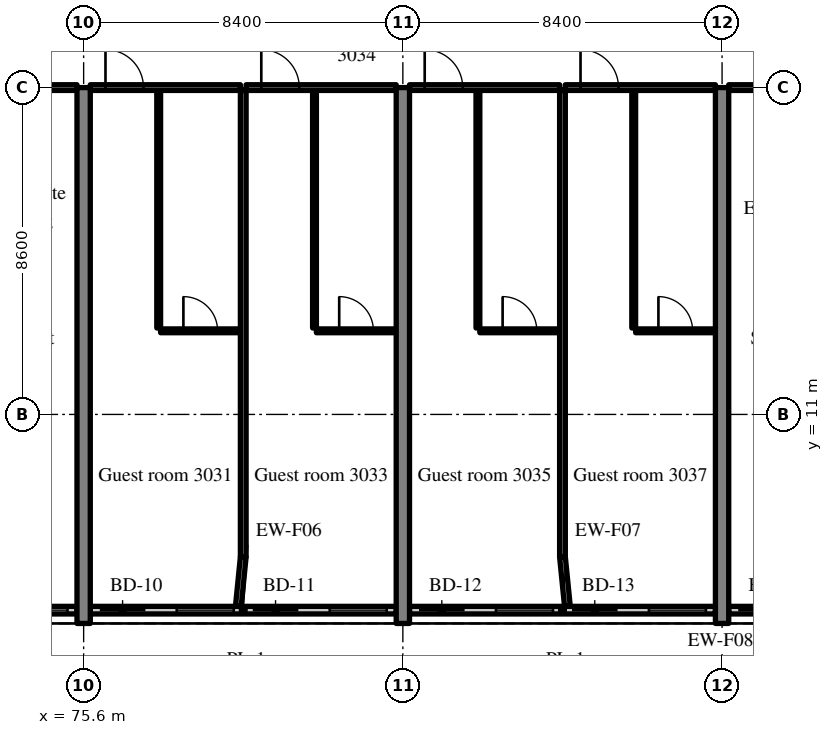
"""IFC4 building model, lengths in metres.
Left out: names, types, materials, properties, quantities, classifications, styles, units other than length and angle.
Written with IfcOpenShell. Run it as: python <this file> out.ifc"""

import sys

from ifc_helpers import new_model, si_unit, direction, frame, frame_2d, origin, place, context, subcontext, project, spatial, rectangle, extrude, source, transform, mapped, element, fill, save


model = new_model("IFC4")
c1 = context("Model", 3, precision=1e-05, world=origin(), true_north=direction((0.0, 1.0)))
c2 = subcontext(c1, "Body", "Model", "MODEL_VIEW")
j1 = project(units=[si_unit("LENGTHUNIT", "METRE"), si_unit("PLANEANGLEUNIT", "RADIAN")], contexts=[c1])
p1 = place(None, origin())
s1 = spatial("IfcSite", under=j1, at=p1, CompositionType="ELEMENT")
p2 = place(p1, origin())
s2 = spatial("IfcBuilding", under=s1, at=p2, CompositionType="ELEMENT")
p3 = place(p2, frame((0.0, 0.0, 125.6)))
s3 = spatial("IfcBuildingStorey", under=s2, at=p3, CompositionType="ELEMENT", Elevation=125.6)
m1 = source(origin(), c2, "Body", "SweptSolid", [
    extrude(rectangle(XDim=14.1, YDim=0.35, at=frame_2d((7.05, 0.0))), origin(), (0.0, 0.0, 1.0), 3.52),
])
for number, where, z_axis, x_axis in (
    (1, (75.6, 5.5, 0.0), (0.0, 0.0, 1.0), (0.0, 1.0, 0.0)),
    (2, (84.0, 5.5, 0.0), (0.0, 0.0, 1.0), (0.0, 1.0, 0.0)),
    (3, (92.4, 5.5, 0.0), (0.0, 0.0, 1.0), (0.0, 1.0, 0.0)),
):
    element("IfcWall", number, at=place(p3, frame(where, z_axis=z_axis, x_axis=x_axis)), inside=s3, PredefinedType="SHEAR", context=c2, shape_type="MappedRepresentation", body=[
        mapped(m1, transform((0.0, 0.0, 0.0), scale=1.0)),
    ])
m2 = source(origin(), c2, "Body", "SweptSolid", [
    extrude(rectangle(XDim=8.05, YDim=0.2, at=frame_2d((4.025, 0.0))), origin(), (0.0, 0.0, 1.0), 2.82),
])
p4 = place(p3, frame((67.375, 5.85, 0.0), z_axis=(0.0, 0.0, 1.0), x_axis=(1.0, 0.0, 0.0)))
e4 = element("IfcWall", 4, at=p4, inside=s3, PredefinedType="SOLIDWALL", context=c2, shape_type="MappedRepresentation", body=[
    mapped(m2, transform((0.0, 0.0, 0.0), scale=1.0)),
])
m3 = source(origin(), c2, "Body", "SweptSolid", [
    extrude(rectangle(XDim=1.2, YDim=2.4, at=frame_2d((0.6, 1.2))), frame((0.0, 0.11, 0.0), z_axis=(0.0, -1.0, 0.0), x_axis=(1.0, 0.0, 0.0)), (0.0, 0.0, 1.0), 0.22),
])
p5 = place(p4, frame((0.25, 0.0, 0.0)))
e5 = element("IfcOpeningElement", 5, at=p5, cuts=e4, PredefinedType="OPENING", context=c2, shape_type="MappedRepresentation", body=[
    mapped(m3, transform((0.0, 0.0, 0.0), scale=1.0)),
])
m4 = source(origin(), c2, "Body", "SweptSolid", [
    extrude(rectangle(XDim=1.5, YDim=1.5, at=frame_2d((0.75, 0.75))), frame((0.0, 0.11, 0.0), z_axis=(0.0, -1.0, 0.0), x_axis=(1.0, 0.0, 0.0)), (0.0, 0.0, 1.0), 0.22),
])
p6 = place(p4, frame((2.275, 0.0, 0.9)))
e6 = element("IfcOpeningElement", 6, at=p6, cuts=e4, PredefinedType="OPENING", context=c2, shape_type="MappedRepresentation", body=[
    mapped(m4, transform((0.0, 0.0, 0.0), scale=1.0)),
])
p7 = place(p4, frame((4.275, 0.0, 0.0)))
e7 = element("IfcOpeningElement", 7, at=p7, cuts=e4, PredefinedType="OPENING", context=c2, shape_type="MappedRepresentation", body=[
    mapped(m3, transform((0.0, 0.0, 0.0), scale=1.0)),
])
p8 = place(p4, frame((6.3, 0.0, 0.9)))
e8 = element("IfcOpeningElement", 8, at=p8, cuts=e4, PredefinedType="OPENING", context=c2, shape_type="MappedRepresentation", body=[
    mapped(m4, transform((0.0, 0.0, 0.0), scale=1.0)),
])
p9 = place(p3, frame((75.775, 5.85, 0.0), z_axis=(0.0, 0.0, 1.0), x_axis=(1.0, 0.0, 0.0)))
e9 = element("IfcWall", 9, at=p9, inside=s3, PredefinedType="SOLIDWALL", context=c2, shape_type="MappedRepresentation", body=[
    mapped(m2, transform((0.0, 0.0, 0.0), scale=1.0)),
])
p10 = place(p9, frame((0.25, 0.0, 0.0)))
e10 = element("IfcOpeningElement", 10, at=p10, cuts=e9, PredefinedType="OPENING", context=c2, shape_type="MappedRepresentation", body=[
    mapped(m3, transform((0.0, 0.0, 0.0), scale=1.0)),
])
p11 = place(p9, frame((2.275, 0.0, 0.9)))
e11 = element("IfcOpeningElement", 11, at=p11, cuts=e9, PredefinedType="OPENING", context=c2, shape_type="MappedRepresentation", body=[
    mapped(m4, transform((0.0, 0.0, 0.0), scale=1.0)),
])
p12 = place(p9, frame((4.275, 0.0, 0.0)))
e12 = element("IfcOpeningElement", 12, at=p12, cuts=e9, PredefinedType="OPENING", context=c2, shape_type="MappedRepresentation", body=[
    mapped(m3, transform((0.0, 0.0, 0.0), scale=1.0)),
])
p13 = place(p9, frame((6.3, 0.0, 0.9)))
e13 = element("IfcOpeningElement", 13, at=p13, cuts=e9, PredefinedType="OPENING", context=c2, shape_type="MappedRepresentation", body=[
    mapped(m4, transform((0.0, 0.0, 0.0), scale=1.0)),
])
p14 = place(p3, frame((84.175, 5.85, 0.0), z_axis=(0.0, 0.0, 1.0), x_axis=(1.0, 0.0, 0.0)))
e14 = element("IfcWall", 14, at=p14, inside=s3, PredefinedType="SOLIDWALL", context=c2, shape_type="MappedRepresentation", body=[
    mapped(m2, transform((0.0, 0.0, 0.0), scale=1.0)),
])
p15 = place(p14, frame((0.25, 0.0, 0.0)))
e15 = element("IfcOpeningElement", 15, at=p15, cuts=e14, PredefinedType="OPENING", context=c2, shape_type="MappedRepresentation", body=[
    mapped(m3, transform((0.0, 0.0, 0.0), scale=1.0)),
])
p16 = place(p14, frame((2.275, 0.0, 0.9)))
e16 = element("IfcOpeningElement", 16, at=p16, cuts=e14, PredefinedType="OPENING", context=c2, shape_type="MappedRepresentation", body=[
    mapped(m4, transform((0.0, 0.0, 0.0), scale=1.0)),
])
p17 = place(p14, frame((4.275, 0.0, 0.0)))
e17 = element("IfcOpeningElement", 17, at=p17, cuts=e14, PredefinedType="OPENING", context=c2, shape_type="MappedRepresentation", body=[
    mapped(m3, transform((0.0, 0.0, 0.0), scale=1.0)),
])
p18 = place(p14, frame((6.3, 0.0, 0.9)))
e18 = element("IfcOpeningElement", 18, at=p18, cuts=e14, PredefinedType="OPENING", context=c2, shape_type="MappedRepresentation", body=[
    mapped(m4, transform((0.0, 0.0, 0.0), scale=1.0)),
])
m5 = source(origin(), c2, "Body", "SweptSolid", [
    extrude(rectangle(XDim=4.08, YDim=0.2, at=frame_2d((2.04, 0.0))), origin(), (0.0, 0.0, 1.0), 2.82),
])
p19 = place(p3, frame((92.575, 5.85, 0.0), z_axis=(0.0, 0.0, 1.0), x_axis=(1.0, 0.0, 0.0)))
e19 = element("IfcWall", 19, at=p19, inside=s3, PredefinedType="SOLIDWALL", context=c2, shape_type="MappedRepresentation", body=[
    mapped(m5, transform((0.0, 0.0, 0.0), scale=1.0)),
])
p20 = place(p19, frame((0.25, 0.0, 0.0)))
e20 = element("IfcOpeningElement", 20, at=p20, cuts=e19, PredefinedType="OPENING", context=c2, shape_type="MappedRepresentation", body=[
    mapped(m3, transform((0.0, 0.0, 0.0), scale=1.0)),
])
p21 = place(p19, frame((2.33, 0.0, 0.9)))
e21 = element("IfcOpeningElement", 21, at=p21, cuts=e19, PredefinedType="OPENING", context=c2, shape_type="MappedRepresentation", body=[
    mapped(m4, transform((0.0, 0.0, 0.0), scale=1.0)),
])
m6 = source(origin(), c2, "Body", "SweptSolid", [
    extrude(rectangle(XDim=3.95, YDim=0.15, at=frame_2d((1.975, 0.0))), origin(), (0.0, 0.0, 1.0), 2.82),
])
p22 = place(p3, frame((71.475, 19.6, 0.0), z_axis=(0.0, 0.0, 1.0), x_axis=(1.0, 0.0, 0.0)))
e22 = element("IfcWall", 22, at=p22, inside=s3, PredefinedType="PARTITIONING", context=c2, shape_type="MappedRepresentation", body=[
    mapped(m6, transform((0.0, 0.0, 0.0), scale=1.0)),
])
m7 = source(origin(), c2, "Body", "SweptSolid", [
    extrude(rectangle(XDim=1.0, YDim=2.1, at=frame_2d((0.5, 1.05))), frame((0.0, 0.085, 0.0), z_axis=(0.0, -1.0, 0.0), x_axis=(1.0, 0.0, 0.0)), (0.0, 0.0, 1.0), 0.17),
])
p23 = place(p22, frame((1.475, 0.0, 0.0)))
e23 = element("IfcOpeningElement", 23, at=p23, cuts=e22, PredefinedType="OPENING", context=c2, shape_type="MappedRepresentation", body=[
    mapped(m7, transform((0.0, 0.0, 0.0), scale=1.0)),
])
m8 = source(origin(), c2, "Body", "SweptSolid", [
    extrude(rectangle(XDim=6.25, YDim=0.1, at=frame_2d((3.125, 0.0))), origin(), (0.0, 0.0, 1.0), 3.52),
])
p24 = place(p3, frame((77.575, 13.275, 0.0), z_axis=(0.0, 0.0, 1.0), x_axis=(0.0, 1.0, 0.0)))
e24 = element("IfcWall", 24, at=p24, inside=s3, PredefinedType="PARTITIONING", context=c2, shape_type="MappedRepresentation", body=[
    mapped(m8, transform((0.0, 0.0, 0.0), scale=1.0)),
])
m9 = source(origin(), c2, "Body", "SweptSolid", [
    extrude(rectangle(XDim=2.1, YDim=0.1, at=frame_2d((1.05, 0.0))), origin(), (0.0, 0.0, 1.0), 3.52),
])
p25 = place(p3, frame((77.625, 13.2, 0.0), z_axis=(0.0, 0.0, 1.0), x_axis=(1.0, 0.0, 0.0)))
e25 = element("IfcWall", 25, at=p25, inside=s3, PredefinedType="PARTITIONING", context=c2, shape_type="MappedRepresentation", body=[
    mapped(m9, transform((0.0, 0.0, 0.0), scale=1.0)),
])
m10 = source(origin(), c2, "Body", "SweptSolid", [
    extrude(rectangle(XDim=0.9, YDim=2.1, at=frame_2d((0.45, 1.05))), frame((0.0, 0.06, 0.0), z_axis=(0.0, -1.0, 0.0), x_axis=(1.0, 0.0, 0.0)), (0.0, 0.0, 1.0), 0.12),
])
p26 = place(p25, frame((0.6, 0.0, 0.0)))
e26 = element("IfcOpeningElement", 26, at=p26, cuts=e25, PredefinedType="OPENING", context=c2, shape_type="MappedRepresentation", body=[
    mapped(m10, transform((0.0, 0.0, 0.0), scale=1.0)),
])
m11 = source(origin(), c2, "Body", "SweptSolid", [
    extrude(rectangle(XDim=3.95, YDim=0.15, at=frame_2d((1.975, 0.0))), origin(), (0.0, 0.0, 1.0), 2.82),
])
p27 = place(p3, frame((75.775, 19.6, 0.0), z_axis=(0.0, 0.0, 1.0), x_axis=(1.0, 0.0, 0.0)))
e27 = element("IfcWall", 27, at=p27, inside=s3, PredefinedType="PARTITIONING", context=c2, shape_type="MappedRepresentation", body=[
    mapped(m11, transform((0.0, 0.0, 0.0), scale=1.0)),
])
p28 = place(p27, frame((0.4, 0.0, 0.0)))
e28 = element("IfcOpeningElement", 28, at=p28, cuts=e27, PredefinedType="OPENING", context=c2, shape_type="MappedRepresentation", body=[
    mapped(m7, transform((0.0, 0.0, 0.0), scale=1.0)),
])
p29 = place(p3, frame((81.675, 13.275, 0.0), z_axis=(0.0, 0.0, 1.0), x_axis=(0.0, 1.0, 0.0)))
e29 = element("IfcWall", 29, at=p29, inside=s3, PredefinedType="PARTITIONING", context=c2, shape_type="MappedRepresentation", body=[
    mapped(m8, transform((0.0, 0.0, 0.0), scale=1.0)),
])
m12 = source(origin(), c2, "Body", "SweptSolid", [
    extrude(rectangle(XDim=2.1, YDim=0.1, at=frame_2d((1.05, 0.0))), origin(), (0.0, 0.0, 1.0), 3.52),
])
p30 = place(p3, frame((81.725, 13.2, 0.0), z_axis=(0.0, 0.0, 1.0), x_axis=(1.0, 0.0, 0.0)))
e30 = element("IfcWall", 30, at=p30, inside=s3, PredefinedType="PARTITIONING", context=c2, shape_type="MappedRepresentation", body=[
    mapped(m12, transform((0.0, 0.0, 0.0), scale=1.0)),
])
p31 = place(p30, frame((0.6, 0.0, 0.0)))
e31 = element("IfcOpeningElement", 31, at=p31, cuts=e30, PredefinedType="OPENING", context=c2, shape_type="MappedRepresentation", body=[
    mapped(m10, transform((0.0, 0.0, 0.0), scale=1.0)),
])
p32 = place(p3, frame((79.875, 19.6, 0.0), z_axis=(0.0, 0.0, 1.0), x_axis=(1.0, 0.0, 0.0)))
e32 = element("IfcWall", 32, at=p32, inside=s3, PredefinedType="PARTITIONING", context=c2, shape_type="MappedRepresentation", body=[
    mapped(m6, transform((0.0, 0.0, 0.0), scale=1.0)),
])
p33 = place(p32, frame((0.4, 0.0, 0.0)))
e33 = element("IfcOpeningElement", 33, at=p33, cuts=e32, PredefinedType="OPENING", context=c2, shape_type="MappedRepresentation", body=[
    mapped(m7, transform((0.0, 0.0, 0.0), scale=1.0)),
])
m13 = source(origin(), c2, "Body", "SweptSolid", [
    extrude(rectangle(XDim=12.275, YDim=0.15, at=frame_2d((6.137, 0.0))), origin(), (0.0, 0.0, 1.0), 3.52),
])
p34 = place(p3, frame((79.8, 7.25, 0.0), z_axis=(0.0, 0.0, 1.0), x_axis=(0.0, 1.0, 0.0)))
e34 = element("IfcWall", 34, at=p34, inside=s3, PredefinedType="PARTITIONING", context=c2, shape_type="MappedRepresentation", body=[
    mapped(m13, transform((0.0, 0.0, 0.0), scale=1.0)),
])
p35 = place(p3, frame((85.975, 13.275, 0.0), z_axis=(0.0, 0.0, 1.0), x_axis=(0.0, 1.0, 0.0)))
e35 = element("IfcWall", 35, at=p35, inside=s3, PredefinedType="PARTITIONING", context=c2, shape_type="MappedRepresentation", body=[
    mapped(m8, transform((0.0, 0.0, 0.0), scale=1.0)),
])
p36 = place(p3, frame((86.025, 13.2, 0.0), z_axis=(0.0, 0.0, 1.0), x_axis=(1.0, 0.0, 0.0)))
e36 = element("IfcWall", 36, at=p36, inside=s3, PredefinedType="PARTITIONING", context=c2, shape_type="MappedRepresentation", body=[
    mapped(m9, transform((0.0, 0.0, 0.0), scale=1.0)),
])
p37 = place(p36, frame((0.6, 0.0, 0.0)))
e37 = element("IfcOpeningElement", 37, at=p37, cuts=e36, PredefinedType="OPENING", context=c2, shape_type="MappedRepresentation", body=[
    mapped(m10, transform((0.0, 0.0, 0.0), scale=1.0)),
])
p38 = place(p3, frame((84.175, 19.6, 0.0), z_axis=(0.0, 0.0, 1.0), x_axis=(1.0, 0.0, 0.0)))
e38 = element("IfcWall", 38, at=p38, inside=s3, PredefinedType="PARTITIONING", context=c2, shape_type="MappedRepresentation", body=[
    mapped(m6, transform((0.0, 0.0, 0.0), scale=1.0)),
])
p39 = place(p38, frame((0.4, 0.0, 0.0)))
e39 = element("IfcOpeningElement", 39, at=p39, cuts=e38, PredefinedType="OPENING", context=c2, shape_type="MappedRepresentation", body=[
    mapped(m7, transform((0.0, 0.0, 0.0), scale=1.0)),
])
p40 = place(p3, frame((90.075, 13.275, 0.0), z_axis=(0.0, 0.0, 1.0), x_axis=(0.0, 1.0, 0.0)))
e40 = element("IfcWall", 40, at=p40, inside=s3, PredefinedType="PARTITIONING", context=c2, shape_type="MappedRepresentation", body=[
    mapped(m8, transform((0.0, 0.0, 0.0), scale=1.0)),
])
p41 = place(p3, frame((90.125, 13.2, 0.0), z_axis=(0.0, 0.0, 1.0), x_axis=(1.0, 0.0, 0.0)))
e41 = element("IfcWall", 41, at=p41, inside=s3, PredefinedType="PARTITIONING", context=c2, shape_type="MappedRepresentation", body=[
    mapped(m9, transform((0.0, 0.0, 0.0), scale=1.0)),
])
p42 = place(p41, frame((0.6, 0.0, 0.0)))
e42 = element("IfcOpeningElement", 42, at=p42, cuts=e41, PredefinedType="OPENING", context=c2, shape_type="MappedRepresentation", body=[
    mapped(m10, transform((0.0, 0.0, 0.0), scale=1.0)),
])
p43 = place(p3, frame((88.275, 19.6, 0.0), z_axis=(0.0, 0.0, 1.0), x_axis=(1.0, 0.0, 0.0)))
e43 = element("IfcWall", 43, at=p43, inside=s3, PredefinedType="PARTITIONING", context=c2, shape_type="MappedRepresentation", body=[
    mapped(m11, transform((0.0, 0.0, 0.0), scale=1.0)),
])
p44 = place(p43, frame((0.4, 0.0, 0.0)))
e44 = element("IfcOpeningElement", 44, at=p44, cuts=e43, PredefinedType="OPENING", context=c2, shape_type="MappedRepresentation", body=[
    mapped(m7, transform((0.0, 0.0, 0.0), scale=1.0)),
])
p45 = place(p3, frame((88.2, 7.25, 0.0), z_axis=(0.0, 0.0, 1.0), x_axis=(0.0, 1.0, 0.0)))
e45 = element("IfcWall", 45, at=p45, inside=s3, PredefinedType="PARTITIONING", context=c2, shape_type="MappedRepresentation", body=[
    mapped(m13, transform((0.0, 0.0, 0.0), scale=1.0)),
])
p46 = place(p3, frame((92.575, 19.6, 0.0), z_axis=(0.0, 0.0, 1.0), x_axis=(1.0, 0.0, 0.0)))
e46 = element("IfcWall", 46, at=p46, inside=s3, PredefinedType="PARTITIONING", context=c2, shape_type="MappedRepresentation", body=[
    mapped(m6, transform((0.0, 0.0, 0.0), scale=1.0)),
])
p47 = place(p46, frame((1.475, 0.0, 0.0)))
e47 = element("IfcOpeningElement", 47, at=p47, cuts=e46, PredefinedType="OPENING", context=c2, shape_type="MappedRepresentation", body=[
    mapped(m7, transform((0.0, 0.0, 0.0), scale=1.0)),
])
m14 = source(origin(), c2, "Body", "SweptSolid", [
    extrude(rectangle(XDim=1.307, YDim=0.15, at=frame_2d((0.653, 0.0))), origin(), (0.0, 0.0, 1.0), 3.52),
])
for number, where, z_axis, x_axis in (
    (48, (79.67, 5.95, 0.0), (0.0, 0.0, 1.0), (0.1, 0.995, 0.0)),
    (49, (88.33, 5.95, 0.0), (0.0, 0.0, 1.0), (-0.1, 0.995, 0.0)),
):
    element("IfcWall", number, at=place(p3, frame(where, z_axis=z_axis, x_axis=x_axis)), inside=s3, PredefinedType="PARTITIONING", context=c2, shape_type="MappedRepresentation", body=[
        mapped(m14, transform((0.0, 0.0, 0.0), scale=1.0)),
    ])
m15 = source(origin(), c2, "Body", "SweptSolid", [
    extrude(rectangle(XDim=1.5, YDim=1.5, at=frame_2d((0.75, 0.75))), frame((0.0, 0.03, 0.0), z_axis=(0.0, -1.0, 0.0), x_axis=(1.0, 0.0, 0.0)), (0.0, 0.0, 1.0), 0.06),
])
p48 = place(p8, origin())
e50 = element("IfcWindow", 50, at=p48, inside=s3, PartitioningType="SINGLE_PANEL", PredefinedType="WINDOW", context=c2, shape_type="MappedRepresentation", body=[
    mapped(m15, transform((0.0, 0.0, 0.0), scale=1.0)),
])
fill(e8, e50)
m16 = source(origin(), c2, "Body", "SweptSolid", [
    extrude(rectangle(XDim=1.2, YDim=2.4, at=frame_2d((0.6, 1.2))), frame((0.0, 0.025, 0.0), z_axis=(0.0, -1.0, 0.0), x_axis=(1.0, 0.0, 0.0)), (0.0, 0.0, 1.0), 0.05),
])
p49 = place(p10, origin())
e51 = element("IfcDoor", 51, at=p49, inside=s3, OperationType="SLIDING_TO_RIGHT", PredefinedType="DOOR", context=c2, shape_type="MappedRepresentation", body=[
    mapped(m16, transform((0.0, 0.0, 0.0), scale=1.0)),
])
fill(e10, e51)
p50 = place(p11, origin())
e52 = element("IfcWindow", 52, at=p50, inside=s3, PartitioningType="SINGLE_PANEL", PredefinedType="WINDOW", context=c2, shape_type="MappedRepresentation", body=[
    mapped(m15, transform((0.0, 0.0, 0.0), scale=1.0)),
])
fill(e11, e52)
p51 = place(p12, origin())
e53 = element("IfcDoor", 53, at=p51, inside=s3, OperationType="SLIDING_TO_LEFT", PredefinedType="DOOR", context=c2, shape_type="MappedRepresentation", body=[
    mapped(m16, transform((0.0, 0.0, 0.0), scale=1.0)),
])
fill(e12, e53)
p52 = place(p13, origin())
e54 = element("IfcWindow", 54, at=p52, inside=s3, PartitioningType="SINGLE_PANEL", PredefinedType="WINDOW", context=c2, shape_type="MappedRepresentation", body=[
    mapped(m15, transform((0.0, 0.0, 0.0), scale=1.0)),
])
fill(e13, e54)
p53 = place(p15, origin())
e55 = element("IfcDoor", 55, at=p53, inside=s3, OperationType="SLIDING_TO_RIGHT", PredefinedType="DOOR", context=c2, shape_type="MappedRepresentation", body=[
    mapped(m16, transform((0.0, 0.0, 0.0), scale=1.0)),
])
fill(e15, e55)
p54 = place(p16, origin())
e56 = element("IfcWindow", 56, at=p54, inside=s3, PartitioningType="SINGLE_PANEL", PredefinedType="WINDOW", context=c2, shape_type="MappedRepresentation", body=[
    mapped(m15, transform((0.0, 0.0, 0.0), scale=1.0)),
])
fill(e16, e56)
p55 = place(p17, origin())
e57 = element("IfcDoor", 57, at=p55, inside=s3, OperationType="SLIDING_TO_LEFT", PredefinedType="DOOR", context=c2, shape_type="MappedRepresentation", body=[
    mapped(m16, transform((0.0, 0.0, 0.0), scale=1.0)),
])
fill(e17, e57)
p56 = place(p18, origin())
e58 = element("IfcWindow", 58, at=p56, inside=s3, PartitioningType="SINGLE_PANEL", PredefinedType="WINDOW", context=c2, shape_type="MappedRepresentation", body=[
    mapped(m15, transform((0.0, 0.0, 0.0), scale=1.0)),
])
fill(e18, e58)
p57 = place(p20, origin())
e59 = element("IfcDoor", 59, at=p57, inside=s3, OperationType="SLIDING_TO_RIGHT", PredefinedType="DOOR", context=c2, shape_type="MappedRepresentation", body=[
    mapped(m16, transform((0.0, 0.0, 0.0), scale=1.0)),
])
fill(e20, e59)
m17 = source(origin(), c2, "Body", "SweptSolid", [
    extrude(rectangle(XDim=0.9, YDim=2.1, at=frame_2d((0.45, 1.05))), frame((0.0, 0.025, 0.0), z_axis=(0.0, -1.0, 0.0), x_axis=(1.0, 0.0, 0.0)), (0.0, 0.0, 1.0), 0.05),
])
p58 = place(p26, origin())
e60 = element("IfcDoor", 60, at=p58, inside=s3, OperationType="SINGLE_SWING_LEFT", PredefinedType="DOOR", context=c2, shape_type="MappedRepresentation", body=[
    mapped(m17, transform((0.0, 0.0, 0.0), scale=1.0)),
])
fill(e26, e60)
m18 = source(origin(), c2, "Body", "SweptSolid", [
    extrude(rectangle(XDim=1.0, YDim=2.1, at=frame_2d((0.5, 1.05))), frame((0.0, 0.025, 0.0), z_axis=(0.0, -1.0, 0.0), x_axis=(1.0, 0.0, 0.0)), (0.0, 0.0, 1.0), 0.05),
])
p59 = place(p28, origin())
e61 = element("IfcDoor", 61, at=p59, inside=s3, OperationType="SINGLE_SWING_LEFT", PredefinedType="DOOR", context=c2, shape_type="MappedRepresentation", body=[
    mapped(m18, transform((0.0, 0.0, 0.0), scale=1.0)),
])
fill(e28, e61)
p60 = place(p31, origin())
e62 = element("IfcDoor", 62, at=p60, inside=s3, OperationType="SINGLE_SWING_LEFT", PredefinedType="DOOR", context=c2, shape_type="MappedRepresentation", body=[
    mapped(m17, transform((0.0, 0.0, 0.0), scale=1.0)),
])
fill(e31, e62)
p61 = place(p33, origin())
e63 = element("IfcDoor", 63, at=p61, inside=s3, OperationType="SINGLE_SWING_LEFT", PredefinedType="DOOR", context=c2, shape_type="MappedRepresentation", body=[
    mapped(m18, transform((0.0, 0.0, 0.0), scale=1.0)),
])
fill(e33, e63)
p62 = place(p37, origin())
e64 = element("IfcDoor", 64, at=p62, inside=s3, OperationType="SINGLE_SWING_LEFT", PredefinedType="DOOR", context=c2, shape_type="MappedRepresentation", body=[
    mapped(m17, transform((0.0, 0.0, 0.0), scale=1.0)),
])
fill(e37, e64)
p63 = place(p39, origin())
e65 = element("IfcDoor", 65, at=p63, inside=s3, OperationType="SINGLE_SWING_LEFT", PredefinedType="DOOR", context=c2, shape_type="MappedRepresentation", body=[
    mapped(m18, transform((0.0, 0.0, 0.0), scale=1.0)),
])
fill(e39, e65)
p64 = place(p42, origin())
e66 = element("IfcDoor", 66, at=p64, inside=s3, OperationType="SINGLE_SWING_LEFT", PredefinedType="DOOR", context=c2, shape_type="MappedRepresentation", body=[
    mapped(m17, transform((0.0, 0.0, 0.0), scale=1.0)),
])
fill(e42, e66)
p65 = place(p44, origin())
e67 = element("IfcDoor", 67, at=p65, inside=s3, OperationType="SINGLE_SWING_LEFT", PredefinedType="DOOR", context=c2, shape_type="MappedRepresentation", body=[
    mapped(m18, transform((0.0, 0.0, 0.0), scale=1.0)),
])
fill(e44, e67)
save(model, sys.argv[1])
